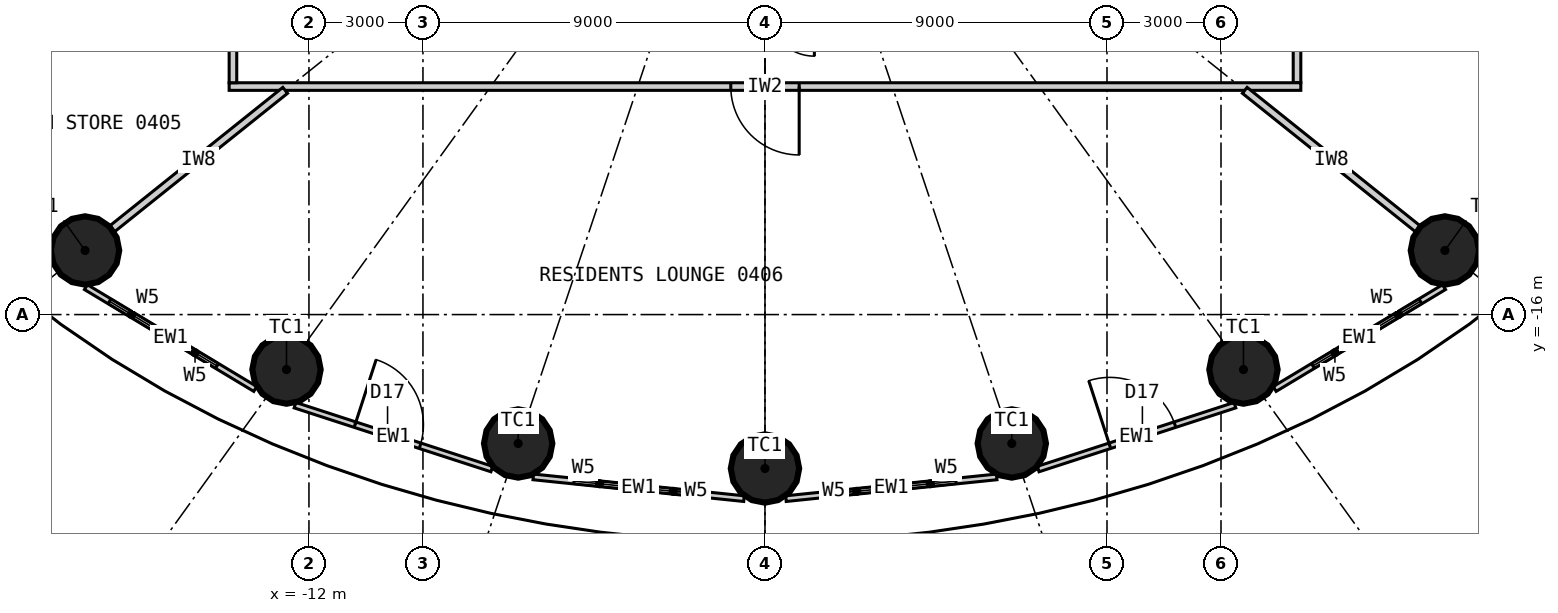
"""IFC4 building model, lengths in metres.
Left out: names, types, materials, properties, quantities, classifications, styles, units other than length and angle.
Written with IfcOpenShell. Run it as: python <this file> out.ifc"""

import sys

from ifc_helpers import new_model, si_unit, direction, frame, frame_2d, origin, origin_2d, place, context, subcontext, project, spatial, rectangle, circle, extrude, element, fill, save


model = new_model("IFC4")
c1 = context("Model", 3, precision=1e-05, world=origin(), true_north=direction((0.0, 1.0)))
c2 = subcontext(c1, "Body", "Model", "MODEL_VIEW")
j1 = project(units=[si_unit("LENGTHUNIT", "METRE"), si_unit("PLANEANGLEUNIT", "RADIAN")], contexts=[c1])
p1 = place(None, origin())
s1 = spatial("IfcSite", under=j1, at=p1, CompositionType="ELEMENT")
p2 = place(p1, origin())
s2 = spatial("IfcBuilding", under=s1, at=p2, CompositionType="ELEMENT")
p3 = place(p2, frame((0.0, 0.0, 24.6)))
s3 = spatial("IfcBuildingStorey", under=s2, at=p3, CompositionType="ELEMENT", Elevation=24.6)
for number, where, z_axis, x_axis in (
    (1, (-17.892, -14.313, 0.0), (0.0, 0.0, 1.0), (1.0, 0.0, 0.0)),
    (2, (-12.591, -17.447, 0.0), (0.0, 0.0, 1.0), (1.0, 0.0, 0.0)),
    (3, (-6.495, -19.391, 0.0), (0.0, 0.0, 1.0), (1.0, 0.0, 0.0)),
    (4, (0.0, -20.05, 0.0), (0.0, 0.0, 1.0), (1.0, 0.0, 0.0)),
    (5, (6.495, -19.391, 0.0), (0.0, 0.0, 1.0), (1.0, 0.0, 0.0)),
    (6, (12.591, -17.447, 0.0), (0.0, 0.0, 1.0), (1.0, 0.0, 0.0)),
    (7, (17.892, -14.313, 0.0), (0.0, 0.0, 1.0), (1.0, 0.0, 0.0)),
):
    element("IfcColumn", number, at=place(p3, frame(where, z_axis=z_axis, x_axis=x_axis)), inside=s3, PredefinedType="COLUMN", context=c2, shape_type="SweptSolid", body=[
        extrude(circle(Radius=0.9, at=origin_2d()), origin(), (0.0, 0.0, 1.0), 4.8),
    ])
p4 = place(p3, frame((-22.239, -11.108, 0.0), z_axis=(0.0, 0.0, 1.0), x_axis=(0.699612594083, -0.714522370679, 0.0)))
e8 = element("IfcWall", 8, at=p4, inside=s3, PredefinedType="ELEMENTEDWALL", context=c2, shape_type="SweptSolid", body=[
    extrude(rectangle(XDim=4.896, YDim=0.15, at=frame_2d((2.448, 0.0))), origin(), (0.0, 0.0, 1.0), 4.62),
])
p5 = place(p4, frame((0.569, 0.0, 0.6)))
e9 = element("IfcOpeningElement", 9, at=p5, cuts=e8, PredefinedType="OPENING", context=c2, shape_type="SweptSolid", body=[
    extrude(rectangle(XDim=1.35, YDim=3.0, at=frame_2d((0.675, 1.5))), frame((0.0, 0.085, 0.0), z_axis=(0.0, -1.0, 0.0), x_axis=(1.0, 0.0, 0.0)), (0.0, 0.0, 1.0), 0.17),
])
p6 = place(p4, frame((2.519, 0.0, 0.6)))
e10 = element("IfcOpeningElement", 10, at=p6, cuts=e8, PredefinedType="OPENING", context=c2, shape_type="SweptSolid", body=[
    extrude(rectangle(XDim=1.35, YDim=3.0, at=frame_2d((0.675, 1.5))), frame((0.0, 0.085, 0.0), z_axis=(0.0, -1.0, 0.0), x_axis=(1.0, 0.0, 0.0)), (0.0, 0.0, 1.0), 0.17),
])
p7 = place(p3, frame((-17.869, -15.277, 0.0), z_axis=(0.0, 0.0, 1.0), x_axis=(0.856958191554, -0.515385931054, 0.0)))
e11 = element("IfcWall", 11, at=p7, inside=s3, PredefinedType="ELEMENTEDWALL", context=c2, shape_type="SweptSolid", body=[
    extrude(rectangle(XDim=5.201, YDim=0.15, at=frame_2d((2.601, 0.0))), origin(), (0.0, 0.0, 1.0), 4.62),
])
p8 = place(p7, frame((0.726, 0.0, 0.6)))
e12 = element("IfcOpeningElement", 12, at=p8, cuts=e11, PredefinedType="OPENING", context=c2, shape_type="SweptSolid", body=[
    extrude(rectangle(XDim=1.35, YDim=3.0, at=frame_2d((0.675, 1.5))), frame((0.0, 0.085, 0.0), z_axis=(0.0, -1.0, 0.0), x_axis=(1.0, 0.0, 0.0)), (0.0, 0.0, 1.0), 0.17),
])
p9 = place(p7, frame((2.676, 0.0, 0.6)))
e13 = element("IfcOpeningElement", 13, at=p9, cuts=e11, PredefinedType="OPENING", context=c2, shape_type="SweptSolid", body=[
    extrude(rectangle(XDim=1.35, YDim=3.0, at=frame_2d((0.675, 1.5))), frame((0.0, 0.085, 0.0), z_axis=(0.0, -1.0, 0.0), x_axis=(1.0, 0.0, 0.0)), (0.0, 0.0, 1.0), 0.17),
])
p10 = place(p3, frame((-12.366, -18.384, 0.0), z_axis=(0.0, 0.0, 1.0), x_axis=(0.951138486029, -0.308764603532, 0.0)))
e14 = element("IfcWall", 14, at=p10, inside=s3, PredefinedType="ELEMENTEDWALL", context=c2, shape_type="SweptSolid", body=[
    extrude(rectangle(XDim=5.444, YDim=0.15, at=frame_2d((2.722, 0.0))), origin(), (0.0, 0.0, 1.0), 4.62),
])
p11 = place(p10, frame((1.66, 0.0, 0.0)))
e15 = element("IfcOpeningElement", 15, at=p11, cuts=e14, PredefinedType="OPENING", context=c2, shape_type="SweptSolid", body=[
    extrude(rectangle(XDim=1.8, YDim=2.7, at=frame_2d((0.9, 1.35))), frame((0.0, 0.085, 0.0), z_axis=(0.0, -1.0, 0.0), x_axis=(1.0, 0.0, 0.0)), (0.0, 0.0, 1.0), 0.17),
])
p12 = place(p3, frame((-6.098, -20.271, 0.0), z_axis=(0.0, 0.0, 1.0), x_axis=(0.994723735084, -0.102589915983, 0.0)))
e16 = element("IfcWall", 16, at=p12, inside=s3, PredefinedType="ELEMENTEDWALL", context=c2, shape_type="SweptSolid", body=[
    extrude(rectangle(XDim=5.576, YDim=0.15, at=frame_2d((2.788, 0.0))), origin(), (0.0, 0.0, 1.0), 4.62),
])
p13 = place(p12, frame((1.079, 0.0, 0.6)))
e17 = element("IfcOpeningElement", 17, at=p13, cuts=e16, PredefinedType="OPENING", context=c2, shape_type="SweptSolid", body=[
    extrude(rectangle(XDim=1.35, YDim=3.0, at=frame_2d((0.675, 1.5))), frame((0.0, 0.085, 0.0), z_axis=(0.0, -1.0, 0.0), x_axis=(1.0, 0.0, 0.0)), (0.0, 0.0, 1.0), 0.17),
])
p14 = place(p12, frame((3.029, 0.0, 0.6)))
e18 = element("IfcOpeningElement", 18, at=p14, cuts=e16, PredefinedType="OPENING", context=c2, shape_type="SweptSolid", body=[
    extrude(rectangle(XDim=1.35, YDim=3.0, at=frame_2d((0.675, 1.5))), frame((0.0, 0.085, 0.0), z_axis=(0.0, -1.0, 0.0), x_axis=(1.0, 0.0, 0.0)), (0.0, 0.0, 1.0), 0.17),
])
p15 = place(p3, frame((0.551, -20.843, 0.0), z_axis=(0.0, 0.0, 1.0), x_axis=(0.994723735084, 0.102589915983, 0.0)))
e19 = element("IfcWall", 19, at=p15, inside=s3, PredefinedType="ELEMENTEDWALL", context=c2, shape_type="SweptSolid", body=[
    extrude(rectangle(XDim=5.576, YDim=0.15, at=frame_2d((2.788, 0.0))), origin(), (0.0, 0.0, 1.0), 4.62),
])
p16 = place(p15, frame((1.197, 0.0, 0.6)))
e20 = element("IfcOpeningElement", 20, at=p16, cuts=e19, PredefinedType="OPENING", context=c2, shape_type="SweptSolid", body=[
    extrude(rectangle(XDim=1.35, YDim=3.0, at=frame_2d((0.675, 1.5))), frame((0.0, 0.085, 0.0), z_axis=(0.0, -1.0, 0.0), x_axis=(1.0, 0.0, 0.0)), (0.0, 0.0, 1.0), 0.17),
])
p17 = place(p15, frame((3.147, 0.0, 0.6)))
e21 = element("IfcOpeningElement", 21, at=p17, cuts=e19, PredefinedType="OPENING", context=c2, shape_type="SweptSolid", body=[
    extrude(rectangle(XDim=1.35, YDim=3.0, at=frame_2d((0.675, 1.5))), frame((0.0, 0.085, 0.0), z_axis=(0.0, -1.0, 0.0), x_axis=(1.0, 0.0, 0.0)), (0.0, 0.0, 1.0), 0.17),
])
p18 = place(p3, frame((7.188, -20.065, 0.0), z_axis=(0.0, 0.0, 1.0), x_axis=(0.951138486029, 0.308764603532, 0.0)))
e22 = element("IfcWall", 22, at=p18, inside=s3, PredefinedType="ELEMENTEDWALL", context=c2, shape_type="SweptSolid", body=[
    extrude(rectangle(XDim=5.444, YDim=0.15, at=frame_2d((2.722, 0.0))), origin(), (0.0, 0.0, 1.0), 4.62),
])
p19 = place(p18, frame((1.984, 0.0, 0.0)))
e23 = element("IfcOpeningElement", 23, at=p19, cuts=e22, PredefinedType="OPENING", context=c2, shape_type="SweptSolid", body=[
    extrude(rectangle(XDim=1.8, YDim=2.7, at=frame_2d((0.9, 1.35))), frame((0.0, 0.085, 0.0), z_axis=(0.0, -1.0, 0.0), x_axis=(1.0, 0.0, 0.0)), (0.0, 0.0, 1.0), 0.17),
])
p20 = place(p3, frame((13.412, -17.957, 0.0), z_axis=(0.0, 0.0, 1.0), x_axis=(0.856958191554, 0.515385931054, 0.0)))
e24 = element("IfcWall", 24, at=p20, inside=s3, PredefinedType="ELEMENTEDWALL", context=c2, shape_type="SweptSolid", body=[
    extrude(rectangle(XDim=5.201, YDim=0.15, at=frame_2d((2.601, 0.0))), origin(), (0.0, 0.0, 1.0), 4.62),
])
p21 = place(p20, frame((1.175, 0.0, 0.6)))
e25 = element("IfcOpeningElement", 25, at=p21, cuts=e24, PredefinedType="OPENING", context=c2, shape_type="SweptSolid", body=[
    extrude(rectangle(XDim=1.35, YDim=3.0, at=frame_2d((0.675, 1.5))), frame((0.0, 0.085, 0.0), z_axis=(0.0, -1.0, 0.0), x_axis=(1.0, 0.0, 0.0)), (0.0, 0.0, 1.0), 0.17),
])
p22 = place(p20, frame((3.125, 0.0, 0.6)))
e26 = element("IfcOpeningElement", 26, at=p22, cuts=e24, PredefinedType="OPENING", context=c2, shape_type="SweptSolid", body=[
    extrude(rectangle(XDim=1.35, YDim=3.0, at=frame_2d((0.675, 1.5))), frame((0.0, 0.085, 0.0), z_axis=(0.0, -1.0, 0.0), x_axis=(1.0, 0.0, 0.0)), (0.0, 0.0, 1.0), 0.17),
])
p23 = place(p3, frame((18.813, -14.607, 0.0), z_axis=(0.0, 0.0, 1.0), x_axis=(0.699612594083, 0.714522370679, 0.0)))
e27 = element("IfcWall", 27, at=p23, inside=s3, PredefinedType="ELEMENTEDWALL", context=c2, shape_type="SweptSolid", body=[
    extrude(rectangle(XDim=4.896, YDim=0.15, at=frame_2d((2.448, 0.0))), origin(), (0.0, 0.0, 1.0), 4.62),
])
p24 = place(p23, frame((1.027, 0.0, 0.6)))
e28 = element("IfcOpeningElement", 28, at=p24, cuts=e27, PredefinedType="OPENING", context=c2, shape_type="SweptSolid", body=[
    extrude(rectangle(XDim=1.35, YDim=3.0, at=frame_2d((0.675, 1.5))), frame((0.0, 0.085, 0.0), z_axis=(0.0, -1.0, 0.0), x_axis=(1.0, 0.0, 0.0)), (0.0, 0.0, 1.0), 0.17),
])
p25 = place(p23, frame((2.977, 0.0, 0.6)))
e29 = element("IfcOpeningElement", 29, at=p25, cuts=e27, PredefinedType="OPENING", context=c2, shape_type="SweptSolid", body=[
    extrude(rectangle(XDim=1.35, YDim=3.0, at=frame_2d((0.675, 1.5))), frame((0.0, 0.085, 0.0), z_axis=(0.0, -1.0, 0.0), x_axis=(1.0, 0.0, 0.0)), (0.0, 0.0, 1.0), 0.17),
])
p26 = place(p3, frame((14.0, -9.9, 0.0), z_axis=(0.0, 0.0, 1.0), x_axis=(0.0, 1.0, 0.0)))
e30 = element("IfcWall", 30, at=p26, inside=s3, PredefinedType="PARTITIONING", context=c2, shape_type="SweptSolid", body=[
    extrude(rectangle(XDim=19.8, YDim=0.2, at=frame_2d((9.9, 0.0))), origin(), (0.0, 0.0, 1.0), 4.62),
])
p27 = place(p26, frame((9.0, 0.0, 0.0)))
e31 = element("IfcOpeningElement", 31, at=p27, cuts=e30, PredefinedType="OPENING", context=c2, shape_type="SweptSolid", body=[
    extrude(rectangle(XDim=1.8, YDim=2.4, at=frame_2d((0.9, 1.2))), frame((0.0, 0.11, 0.0), z_axis=(0.0, -1.0, 0.0), x_axis=(1.0, 0.0, 0.0)), (0.0, 0.0, 1.0), 0.22),
])
p28 = place(p3, frame((14.1, -10.0, 0.0), z_axis=(0.0, 0.0, 1.0), x_axis=(-1.0, 0.0, 0.0)))
e32 = element("IfcWall", 32, at=p28, inside=s3, PredefinedType="PARTITIONING", context=c2, shape_type="SweptSolid", body=[
    extrude(rectangle(XDim=28.2, YDim=0.2, at=frame_2d((14.1, 0.0))), origin(), (0.0, 0.0, 1.0), 4.62),
])
p29 = place(p28, frame((13.2, 0.0, 0.0)))
e33 = element("IfcOpeningElement", 33, at=p29, cuts=e32, PredefinedType="OPENING", context=c2, shape_type="SweptSolid", body=[
    extrude(rectangle(XDim=1.8, YDim=2.4, at=frame_2d((0.9, 1.2))), frame((0.0, 0.11, 0.0), z_axis=(0.0, -1.0, 0.0), x_axis=(1.0, 0.0, 0.0)), (0.0, 0.0, 1.0), 0.22),
])
p30 = place(p3, frame((-14.0, 9.9, 0.0), z_axis=(0.0, 0.0, 1.0), x_axis=(0.0, -1.0, 0.0)))
e34 = element("IfcWall", 34, at=p30, inside=s3, PredefinedType="PARTITIONING", context=c2, shape_type="SweptSolid", body=[
    extrude(rectangle(XDim=19.8, YDim=0.2, at=frame_2d((9.9, 0.0))), origin(), (0.0, 0.0, 1.0), 4.62),
])
p31 = place(p30, frame((2.889, 0.0, 0.0)))
e35 = element("IfcOpeningElement", 35, at=p31, cuts=e34, PredefinedType="OPENING", context=c2, shape_type="SweptSolid", body=[
    extrude(rectangle(XDim=0.9, YDim=2.1, at=frame_2d((0.45, 1.05))), frame((0.0, 0.11, 0.0), z_axis=(0.0, -1.0, 0.0), x_axis=(1.0, 0.0, 0.0)), (0.0, 0.0, 1.0), 0.22),
])
p32 = place(p30, frame((9.45, 0.0, 0.0)))
e36 = element("IfcOpeningElement", 36, at=p32, cuts=e34, PredefinedType="OPENING", context=c2, shape_type="SweptSolid", body=[
    extrude(rectangle(XDim=0.9, YDim=2.1, at=frame_2d((0.45, 1.05))), frame((0.0, 0.11, 0.0), z_axis=(0.0, -1.0, 0.0), x_axis=(1.0, 0.0, 0.0)), (0.0, 0.0, 1.0), 0.22),
])
p33 = place(p30, frame((14.167, 0.0, 0.0)))
e37 = element("IfcOpeningElement", 37, at=p33, cuts=e34, PredefinedType="OPENING", context=c2, shape_type="SweptSolid", body=[
    extrude(rectangle(XDim=1.0, YDim=2.2, at=frame_2d((0.5, 1.1))), frame((0.0, 0.11, 0.0), z_axis=(0.0, -1.0, 0.0), x_axis=(1.0, 0.0, 0.0)), (0.0, 0.0, 1.0), 0.22),
])
p34 = place(p30, frame((17.756, 0.0, 0.0)))
e38 = element("IfcOpeningElement", 38, at=p34, cuts=e34, PredefinedType="OPENING", context=c2, shape_type="SweptSolid", body=[
    extrude(rectangle(XDim=0.9, YDim=2.2, at=frame_2d((0.45, 1.1))), frame((0.0, 0.11, 0.0), z_axis=(0.0, -1.0, 0.0), x_axis=(1.0, 0.0, 0.0)), (0.0, 0.0, 1.0), 0.22),
])
p35 = place(p3, frame((-18.5, -8.545, 0.0), z_axis=(0.0, 0.0, 1.0), x_axis=(-0.90784411614, -0.419307835355, 0.0)))
e39 = element("IfcWall", 39, at=p35, inside=s3, PredefinedType="PARTITIONING", context=c2, shape_type="SweptSolid", body=[
    extrude(rectangle(XDim=2.977, YDim=0.2, at=frame_2d((1.488, 0.0))), origin(), (0.0, 0.0, 1.0), 3.82),
])
p36 = place(p35, frame((1.038, 0.0, 0.0)))
e40 = element("IfcOpeningElement", 40, at=p36, cuts=e39, PredefinedType="OPENING", context=c2, shape_type="SweptSolid", body=[
    extrude(rectangle(XDim=0.9, YDim=2.2, at=frame_2d((0.45, 1.1))), frame((0.0, 0.11, 0.0), z_axis=(0.0, -1.0, 0.0), x_axis=(1.0, 0.0, 0.0)), (0.0, 0.0, 1.0), 0.22),
])
for number, where, z_axis, x_axis in (
    (41, (-12.625, -10.1, 0.0), (0.0, 0.0, 1.0), (-0.781, -0.625, 0.0)),
    (42, (12.625, -10.1, 0.0), (0.0, 0.0, 1.0), (0.781, -0.625, 0.0)),
):
    element("IfcWall", number, at=place(p3, frame(where, z_axis=z_axis, x_axis=x_axis)), inside=s3, PredefinedType="PARTITIONING", context=c2, shape_type="SweptSolid", body=[
        extrude(rectangle(XDim=5.845, YDim=0.2, at=frame_2d((2.922, 0.0))), origin(), (0.0, 0.0, 1.0), 3.82),
    ])
p37 = place(p8, origin())
e43 = element("IfcWindow", 43, at=p37, inside=s3, PartitioningType="SINGLE_PANEL", PredefinedType="WINDOW", context=c2, shape_type="SweptSolid", body=[
    extrude(rectangle(XDim=1.35, YDim=3.0, at=frame_2d((0.675, 1.5))), frame((0.0, 0.03, 0.0), z_axis=(0.0, -1.0, 0.0), x_axis=(1.0, 0.0, 0.0)), (0.0, 0.0, 1.0), 0.06),
])
fill(e12, e43)
p38 = place(p9, origin())
e44 = element("IfcWindow", 44, at=p38, inside=s3, PartitioningType="SINGLE_PANEL", PredefinedType="WINDOW", context=c2, shape_type="SweptSolid", body=[
    extrude(rectangle(XDim=1.35, YDim=3.0, at=frame_2d((0.675, 1.5))), frame((0.0, 0.03, 0.0), z_axis=(0.0, -1.0, 0.0), x_axis=(1.0, 0.0, 0.0)), (0.0, 0.0, 1.0), 0.06),
])
fill(e13, e44)
p39 = place(p11, origin())
e45 = element("IfcDoor", 45, at=p39, inside=s3, OperationType="DOUBLE_DOOR_DOUBLE_SWING", PredefinedType="DOOR", context=c2, shape_type="SweptSolid", body=[
    extrude(rectangle(XDim=1.8, YDim=2.7, at=frame_2d((0.9, 1.35))), frame((0.0, 0.025, 0.0), z_axis=(0.0, -1.0, 0.0), x_axis=(1.0, 0.0, 0.0)), (0.0, 0.0, 1.0), 0.05),
])
fill(e15, e45)
p40 = place(p13, origin())
e46 = element("IfcWindow", 46, at=p40, inside=s3, PartitioningType="SINGLE_PANEL", PredefinedType="WINDOW", context=c2, shape_type="SweptSolid", body=[
    extrude(rectangle(XDim=1.35, YDim=3.0, at=frame_2d((0.675, 1.5))), frame((0.0, 0.03, 0.0), z_axis=(0.0, -1.0, 0.0), x_axis=(1.0, 0.0, 0.0)), (0.0, 0.0, 1.0), 0.06),
])
fill(e17, e46)
p41 = place(p14, origin())
e47 = element("IfcWindow", 47, at=p41, inside=s3, PartitioningType="SINGLE_PANEL", PredefinedType="WINDOW", context=c2, shape_type="SweptSolid", body=[
    extrude(rectangle(XDim=1.35, YDim=3.0, at=frame_2d((0.675, 1.5))), frame((0.0, 0.03, 0.0), z_axis=(0.0, -1.0, 0.0), x_axis=(1.0, 0.0, 0.0)), (0.0, 0.0, 1.0), 0.06),
])
fill(e18, e47)
p42 = place(p16, origin())
e48 = element("IfcWindow", 48, at=p42, inside=s3, PartitioningType="SINGLE_PANEL", PredefinedType="WINDOW", context=c2, shape_type="SweptSolid", body=[
    extrude(rectangle(XDim=1.35, YDim=3.0, at=frame_2d((0.675, 1.5))), frame((0.0, 0.03, 0.0), z_axis=(0.0, -1.0, 0.0), x_axis=(1.0, 0.0, 0.0)), (0.0, 0.0, 1.0), 0.06),
])
fill(e20, e48)
p43 = place(p17, origin())
e49 = element("IfcWindow", 49, at=p43, inside=s3, PartitioningType="SINGLE_PANEL", PredefinedType="WINDOW", context=c2, shape_type="SweptSolid", body=[
    extrude(rectangle(XDim=1.35, YDim=3.0, at=frame_2d((0.675, 1.5))), frame((0.0, 0.03, 0.0), z_axis=(0.0, -1.0, 0.0), x_axis=(1.0, 0.0, 0.0)), (0.0, 0.0, 1.0), 0.06),
])
fill(e21, e49)
p44 = place(p19, origin())
e50 = element("IfcDoor", 50, at=p44, inside=s3, OperationType="DOUBLE_DOOR_DOUBLE_SWING", PredefinedType="DOOR", context=c2, shape_type="SweptSolid", body=[
    extrude(rectangle(XDim=1.8, YDim=2.7, at=frame_2d((0.9, 1.35))), frame((0.0, 0.025, 0.0), z_axis=(0.0, -1.0, 0.0), x_axis=(1.0, 0.0, 0.0)), (0.0, 0.0, 1.0), 0.05),
])
fill(e23, e50)
p45 = place(p21, origin())
e51 = element("IfcWindow", 51, at=p45, inside=s3, PartitioningType="SINGLE_PANEL", PredefinedType="WINDOW", context=c2, shape_type="SweptSolid", body=[
    extrude(rectangle(XDim=1.35, YDim=3.0, at=frame_2d((0.675, 1.5))), frame((0.0, 0.03, 0.0), z_axis=(0.0, -1.0, 0.0), x_axis=(1.0, 0.0, 0.0)), (0.0, 0.0, 1.0), 0.06),
])
fill(e25, e51)
p46 = place(p22, origin())
e52 = element("IfcWindow", 52, at=p46, inside=s3, PartitioningType="SINGLE_PANEL", PredefinedType="WINDOW", context=c2, shape_type="SweptSolid", body=[
    extrude(rectangle(XDim=1.35, YDim=3.0, at=frame_2d((0.675, 1.5))), frame((0.0, 0.03, 0.0), z_axis=(0.0, -1.0, 0.0), x_axis=(1.0, 0.0, 0.0)), (0.0, 0.0, 1.0), 0.06),
])
fill(e26, e52)
p47 = place(p29, origin())
e53 = element("IfcDoor", 53, at=p47, inside=s3, OperationType="DOUBLE_DOOR_DOUBLE_SWING", PredefinedType="DOOR", context=c2, shape_type="SweptSolid", body=[
    extrude(rectangle(XDim=1.8, YDim=2.4, at=frame_2d((0.9, 1.2))), frame((0.0, 0.025, 0.0), z_axis=(0.0, -1.0, 0.0), x_axis=(1.0, 0.0, 0.0)), (0.0, 0.0, 1.0), 0.05),
])
fill(e33, e53)
save(model, sys.argv[1])
